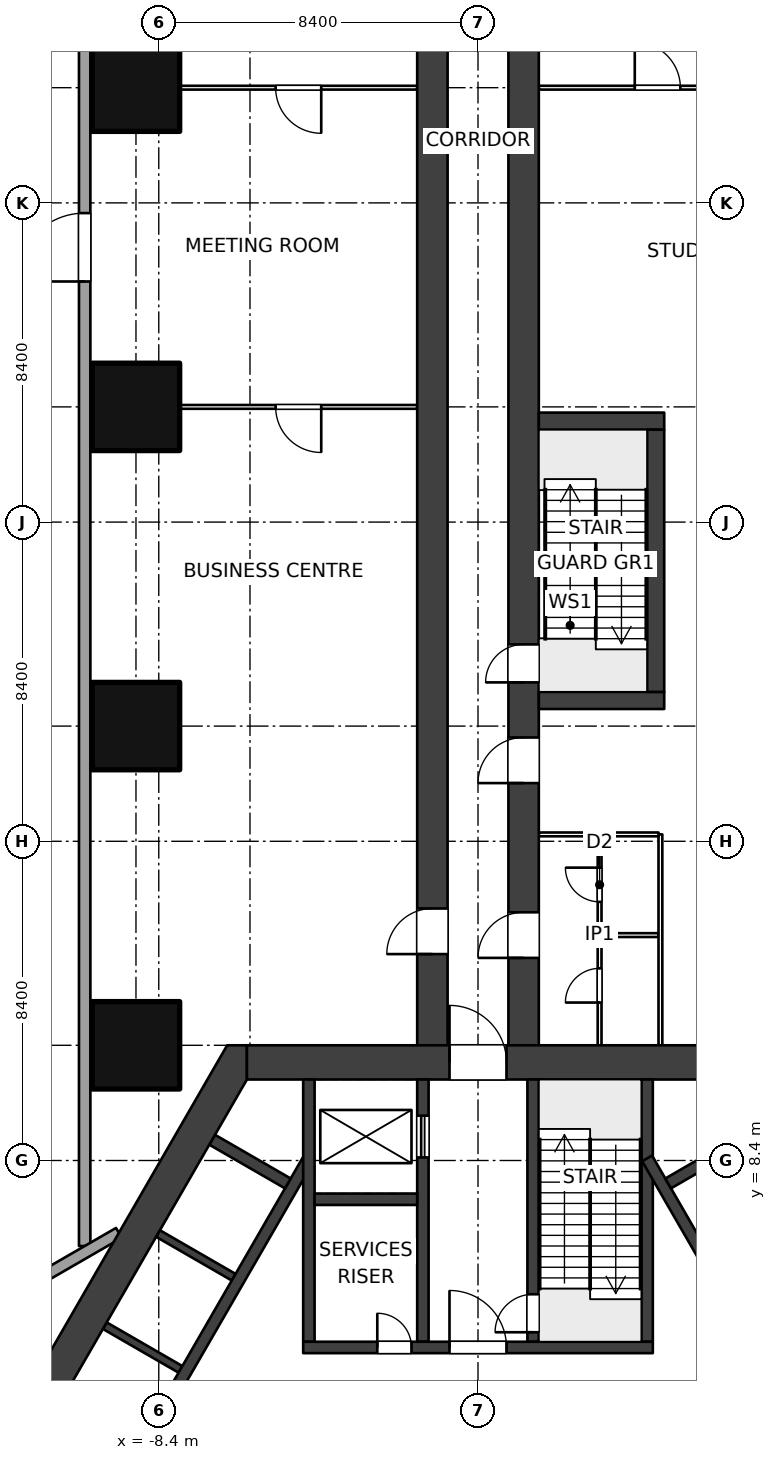
"""IFC4 building model, lengths in metres.
Left out: names, types, materials, properties, quantities, classifications, styles, units other than length and angle.
Written with IfcOpenShell. Run it as: python <this file> out.ifc"""

import sys

from ifc_helpers import new_model, si_unit, direction, frame, frame_2d, origin, origin_2d, place, context, subcontext, project, spatial, polyline, rectangle, outline, extrude, element, fill, save


model = new_model("IFC4")
c1 = context("Model", 3, precision=1e-05, world=origin(), true_north=direction((0.0, 1.0)))
c2 = subcontext(c1, "Body", "Model", "MODEL_VIEW")
j1 = project(units=[si_unit("LENGTHUNIT", "METRE"), si_unit("PLANEANGLEUNIT", "RADIAN")], contexts=[c1])
p1 = place(None, origin())
s1 = spatial("IfcSite", under=j1, at=p1, CompositionType="ELEMENT")
p2 = place(p1, origin())
s2 = spatial("IfcBuilding", under=s1, at=p2, CompositionType="ELEMENT")
p3 = place(p2, frame((0.0, 0.0, 6.0)))
s3 = spatial("IfcBuildingStorey", under=s2, at=p3, CompositionType="ELEMENT", Elevation=6.0)
for number, where, z_axis, x_axis in (
    (1, (-9.0, 11.432, 0.0), (0.0, 0.0, 1.0), (1.0, 0.0, 0.0)),
    (2, (-9.0, 19.832, 0.0), (0.0, 0.0, 1.0), (1.0, 0.0, 0.0)),
    (3, (-9.0, 28.231, 0.0), (0.0, 0.0, 1.0), (1.0, 0.0, 0.0)),
    (4, (-9.0, 36.632, 0.0), (0.0, 0.0, 1.0), (1.0, 0.0, 0.0)),
):
    element("IfcColumn", number, at=place(p3, frame(where, z_axis=z_axis, x_axis=x_axis)), inside=s3, PredefinedType="COLUMN", context=c2, shape_type="SweptSolid", body=[
        extrude(rectangle(XDim=2.3, YDim=2.3, at=origin_2d()), origin(), (0.0, 0.0, 1.0), 5.0),
    ])
p4 = place(p3, frame((-6.08, 10.981, 0.0), z_axis=(0.0, 0.0, 1.0), x_axis=(1.0, 0.0, 0.0)))
e5 = element("IfcWall", 5, at=p4, inside=s3, PredefinedType="SHEAR", context=c2, shape_type="SweptSolid", body=[
    extrude(rectangle(XDim=12.161, YDim=0.9, at=frame_2d((6.08, 0.0))), origin(), (0.0, 0.0, 1.0), 5.0),
])
p5 = place(p4, frame((5.33, 0.0, 0.0)))
e6 = element("IfcOpeningElement", 6, at=p5, cuts=e5, PredefinedType="OPENING", context=c2, shape_type="SweptSolid", body=[
    extrude(rectangle(XDim=1.5, YDim=2.1, at=frame_2d((0.75, 1.05))), frame((0.0, 0.46, 0.0), z_axis=(0.0, -1.0, 0.0), x_axis=(1.0, 0.0, 0.0)), (0.0, 0.0, 1.0), 0.92),
])
p6 = place(p3, origin())
e7 = element("IfcWall", 7, at=p6, inside=s3, PredefinedType="SHEAR", context=c2, shape_type="SweptSolid", body=[
    extrude(outline(polyline([(-6.6, 11.432), (-13.2, 0.0), (-12.94, -0.45), (-12.161, 0.0), (-6.08, 10.531), (-6.08, 11.432), (-6.6, 11.432)])), origin(), (0.0, 0.0, 1.0), 5.0),
])
p7 = place(p3, frame((-4.6, 3.48, 0.0), z_axis=(0.0, 0.0, 1.0), x_axis=(1.0, 0.0, 0.0)))
e8 = element("IfcWall", 8, at=p7, inside=s3, PredefinedType="SHEAR", context=c2, shape_type="SweptSolid", body=[
    extrude(rectangle(XDim=9.2, YDim=0.3, at=frame_2d((4.6, 0.0))), origin(), (0.0, 0.0, 1.0), 5.0),
])
p8 = place(p7, frame((3.85, 0.0, 0.0)))
e9 = element("IfcOpeningElement", 9, at=p8, cuts=e8, PredefinedType="OPENING", context=c2, shape_type="SweptSolid", body=[
    extrude(rectangle(XDim=1.5, YDim=2.1, at=frame_2d((0.75, 1.05))), frame((0.0, 0.16, 0.0), z_axis=(0.0, -1.0, 0.0), x_axis=(1.0, 0.0, 0.0)), (0.0, 0.0, 1.0), 0.32),
])
p9 = place(p7, frame((1.95, 0.0, 0.0)))
e10 = element("IfcOpeningElement", 10, at=p9, cuts=e8, PredefinedType="OPENING", context=c2, shape_type="SweptSolid", body=[
    extrude(rectangle(XDim=0.9, YDim=2.1, at=frame_2d((0.45, 1.05))), frame((0.0, 0.16, 0.0), z_axis=(0.0, -1.0, 0.0), x_axis=(1.0, 0.0, 0.0)), (0.0, 0.0, 1.0), 0.32),
])
p10 = place(p3, frame((1.45, 3.63, 0.0), z_axis=(0.0, 0.0, 1.0), x_axis=(0.0, 1.0, 0.0)))
e11 = element("IfcWall", 11, at=p10, inside=s3, PredefinedType="SHEAR", context=c2, shape_type="SweptSolid", body=[
    extrude(rectangle(XDim=6.902, YDim=0.3, at=frame_2d((3.451, 0.0))), origin(), (0.0, 0.0, 1.0), 5.0),
])
p11 = place(p10, frame((0.25, 0.0, 0.0)))
e12 = element("IfcOpeningElement", 12, at=p11, cuts=e11, PredefinedType="OPENING", context=c2, shape_type="SweptSolid", body=[
    extrude(rectangle(XDim=1.0, YDim=2.1, at=frame_2d((0.5, 1.05))), frame((0.0, 0.16, 0.0), z_axis=(0.0, -1.0, 0.0), x_axis=(1.0, 0.0, 0.0)), (0.0, 0.0, 1.0), 0.32),
])
p12 = place(p3, frame((4.45, 3.63, 0.0), z_axis=(0.0, 0.0, 1.0), x_axis=(0.0, 1.0, 0.0)))
e13 = element("IfcWall", 13, at=p12, inside=s3, PredefinedType="SHEAR", context=c2, shape_type="SweptSolid", body=[
    extrude(rectangle(XDim=6.902, YDim=0.3, at=frame_2d((3.451, 0.0))), origin(), (0.0, 0.0, 1.0), 5.0),
])
p13 = place(p3, frame((-1.45, 3.63, 0.0), z_axis=(0.0, 0.0, 1.0), x_axis=(0.0, 1.0, 0.0)))
e14 = element("IfcWall", 14, at=p13, inside=s3, PredefinedType="SHEAR", context=c2, shape_type="SweptSolid", body=[
    extrude(rectangle(XDim=6.902, YDim=0.3, at=frame_2d((3.451, 0.0))), origin(), (0.0, 0.0, 1.0), 5.0),
])
p14 = place(p13, frame((4.85, 0.0, 0.0)))
e15 = element("IfcOpeningElement", 15, at=p14, cuts=e14, PredefinedType="OPENING", context=c2, shape_type="SweptSolid", body=[
    extrude(rectangle(XDim=1.1, YDim=2.1, at=frame_2d((0.55, 1.05))), frame((0.0, 0.16, 0.0), z_axis=(0.0, -1.0, 0.0), x_axis=(1.0, 0.0, 0.0)), (0.0, 0.0, 1.0), 0.32),
])
p15 = place(p3, frame((-4.45, 3.63, 0.0), z_axis=(0.0, 0.0, 1.0), x_axis=(0.0, 1.0, 0.0)))
e16 = element("IfcWall", 16, at=p15, inside=s3, PredefinedType="SHEAR", context=c2, shape_type="SweptSolid", body=[
    extrude(rectangle(XDim=6.902, YDim=0.3, at=frame_2d((3.451, 0.0))), origin(), (0.0, 0.0, 1.0), 5.0),
])
p16 = place(p3, frame((-4.3, 7.38, 0.0), z_axis=(0.0, 0.0, 1.0), x_axis=(1.0, 0.0, 0.0)))
e17 = element("IfcWall", 17, at=p16, inside=s3, PredefinedType="SHEAR", context=c2, shape_type="SweptSolid", body=[
    extrude(rectangle(XDim=2.7, YDim=0.3, at=frame_2d((1.35, 0.0))), origin(), (0.0, 0.0, 1.0), 5.0),
])
p17 = place(p3, frame((4.45, 8.455, 0.0), z_axis=(0.0, 0.0, 1.0), x_axis=(0.500002290144, -0.866024081565, 0.0)))
e18 = element("IfcWall", 18, at=p17, inside=s3, PredefinedType="SHEAR", context=c2, shape_type="SweptSolid", body=[
    extrude(rectangle(XDim=10.195, YDim=0.3, at=frame_2d((5.098, 0.0))), origin(), (0.0, 0.0, 1.0), 5.0),
])
p18 = place(p3, frame((5.004, 7.796, 0.0), z_axis=(0.0, 0.0, 1.0), x_axis=(0.866053019151, 0.499952165731, 0.0)))
e19 = element("IfcWall", 19, at=p18, inside=s3, PredefinedType="SHEAR", context=c2, shape_type="SweptSolid", body=[
    extrude(rectangle(XDim=2.3, YDim=0.3, at=frame_2d((1.15, 0.0))), origin(), (0.0, 0.0, 1.0), 5.0),
])
p19 = place(p3, frame((-9.548, -0.374, 0.0), z_axis=(0.0, 0.0, 1.0), x_axis=(0.500002290144, 0.866024081565, 0.0)))
e20 = element("IfcWall", 20, at=p19, inside=s3, PredefinedType="SHEAR", context=c2, shape_type="SweptSolid", body=[
    extrude(rectangle(XDim=10.195, YDim=0.3, at=frame_2d((5.098, 0.0))), origin(), (0.0, 0.0, 1.0), 5.0),
])
p20 = place(p3, frame((-5.004, 7.796, 0.0), z_axis=(0.0, 0.0, 1.0), x_axis=(-0.866053019151, 0.499952165731, 0.0)))
e21 = element("IfcWall", 21, at=p20, inside=s3, PredefinedType="SHEAR", context=c2, shape_type="SweptSolid", body=[
    extrude(rectangle(XDim=2.3, YDim=0.3, at=frame_2d((1.15, 0.0))), origin(), (0.0, 0.0, 1.0), 5.0),
])
for number, where, z_axis, x_axis in (
    (22, (-7.829, 2.903, 0.0), (0.0, 0.0, 1.0), (-0.866, 0.5, 0.0)),
    (23, (-6.429, 5.328, 0.0), (0.0, 0.0, 1.0), (-0.866, 0.5, 0.0)),
):
    element("IfcWall", number, at=place(p3, frame(where, z_axis=z_axis, x_axis=x_axis)), inside=s3, PredefinedType="SHEAR", context=c2, shape_type="SweptSolid", body=[
        extrude(rectangle(XDim=2.3, YDim=0.2, at=frame_2d((1.15, 0.0))), origin(), (0.0, 0.0, 1.0), 5.0),
    ])
p21 = place(p3, frame((-1.2, 10.981, 0.0), z_axis=(0.0, 0.0, 1.0), x_axis=(0.0, 1.0, 0.0)))
e24 = element("IfcWall", 24, at=p21, inside=s3, PredefinedType="SHEAR", context=c2, shape_type="SweptSolid", body=[
    extrude(rectangle(XDim=36.75, YDim=0.8, at=frame_2d((18.375, 0.0))), origin(), (0.0, 0.0, 1.0), 5.0),
])
p22 = place(p21, frame((2.85, 0.0, 0.0)))
e25 = element("IfcOpeningElement", 25, at=p22, cuts=e24, PredefinedType="OPENING", context=c2, shape_type="SweptSolid", body=[
    extrude(rectangle(XDim=1.2, YDim=2.1, at=frame_2d((0.6, 1.05))), frame((0.0, 0.41, 0.0), z_axis=(0.0, -1.0, 0.0), x_axis=(1.0, 0.0, 0.0)), (0.0, 0.0, 1.0), 0.82),
])
p23 = place(p3, frame((1.2, 10.981, 0.0), z_axis=(0.0, 0.0, 1.0), x_axis=(0.0, 1.0, 0.0)))
e26 = element("IfcWall", 26, at=p23, inside=s3, PredefinedType="SHEAR", context=c2, shape_type="SweptSolid", body=[
    extrude(rectangle(XDim=36.75, YDim=0.8, at=frame_2d((18.375, 0.0))), origin(), (0.0, 0.0, 1.0), 5.0),
])
p24 = place(p23, frame((10.0, 0.0, 0.0)))
e27 = element("IfcOpeningElement", 27, at=p24, cuts=e26, PredefinedType="OPENING", context=c2, shape_type="SweptSolid", body=[
    extrude(rectangle(XDim=1.0, YDim=2.1, at=frame_2d((0.5, 1.05))), frame((0.0, 0.41, 0.0), z_axis=(0.0, -1.0, 0.0), x_axis=(1.0, 0.0, 0.0)), (0.0, 0.0, 1.0), 0.82),
])
p25 = place(p23, frame((2.75, 0.0, 0.0)))
e28 = element("IfcOpeningElement", 28, at=p25, cuts=e26, PredefinedType="OPENING", context=c2, shape_type="SweptSolid", body=[
    extrude(rectangle(XDim=1.2, YDim=2.1, at=frame_2d((0.6, 1.05))), frame((0.0, 0.41, 0.0), z_axis=(0.0, -1.0, 0.0), x_axis=(1.0, 0.0, 0.0)), (0.0, 0.0, 1.0), 0.82),
])
p26 = place(p23, frame((7.35, 0.0, 0.0)))
e29 = element("IfcOpeningElement", 29, at=p26, cuts=e26, PredefinedType="OPENING", context=c2, shape_type="SweptSolid", body=[
    extrude(rectangle(XDim=1.2, YDim=2.1, at=frame_2d((0.6, 1.05))), frame((0.0, 0.41, 0.0), z_axis=(0.0, -1.0, 0.0), x_axis=(1.0, 0.0, 0.0)), (0.0, 0.0, 1.0), 0.82),
])
p27 = place(p3, frame((-1.6, 28.231, 0.0), z_axis=(0.0, 0.0, 1.0), x_axis=(-1.0, 0.0, 0.0)))
e30 = element("IfcWall", 30, at=p27, inside=s3, PredefinedType="PARTITIONING", context=c2, shape_type="SweptSolid", body=[
    extrude(rectangle(XDim=6.25, YDim=0.1, at=frame_2d((3.125, 0.0))), origin(), (0.0, 0.0, 1.0), 2.9),
])
p28 = place(p27, frame((2.525, 0.0, 0.0)))
e31 = element("IfcOpeningElement", 31, at=p28, cuts=e30, PredefinedType="OPENING", context=c2, shape_type="SweptSolid", body=[
    extrude(rectangle(XDim=1.2, YDim=2.1, at=frame_2d((0.6, 1.05))), frame((0.0, 0.06, 0.0), z_axis=(0.0, -1.0, 0.0), x_axis=(1.0, 0.0, 0.0)), (0.0, 0.0, 1.0), 0.12),
])
p29 = place(p3, frame((-1.6, 36.632, 0.0), z_axis=(0.0, 0.0, 1.0), x_axis=(-1.0, 0.0, 0.0)))
e32 = element("IfcWall", 32, at=p29, inside=s3, PredefinedType="PARTITIONING", context=c2, shape_type="SweptSolid", body=[
    extrude(rectangle(XDim=6.25, YDim=0.1, at=frame_2d((3.125, 0.0))), origin(), (0.0, 0.0, 1.0), 2.9),
])
p30 = place(p29, frame((2.525, 0.0, 0.0)))
e33 = element("IfcOpeningElement", 33, at=p30, cuts=e32, PredefinedType="OPENING", context=c2, shape_type="SweptSolid", body=[
    extrude(rectangle(XDim=1.2, YDim=2.1, at=frame_2d((0.6, 1.05))), frame((0.0, 0.06, 0.0), z_axis=(0.0, -1.0, 0.0), x_axis=(1.0, 0.0, 0.0)), (0.0, 0.0, 1.0), 0.12),
])
p31 = place(p3, frame((3.2, 11.432, 0.0), z_axis=(0.0, 0.0, 1.0), x_axis=(0.0, 1.0, 0.0)))
e34 = element("IfcWall", 34, at=p31, inside=s3, PredefinedType="PARTITIONING", context=c2, shape_type="SweptSolid", body=[
    extrude(rectangle(XDim=5.6, YDim=0.1, at=frame_2d((2.8, 0.0))), origin(), (0.0, 0.0, 1.0), 4.7),
])
p32 = place(p31, frame((1.125, 0.0, 0.0)))
e35 = element("IfcOpeningElement", 35, at=p32, cuts=e34, PredefinedType="OPENING", context=c2, shape_type="SweptSolid", body=[
    extrude(rectangle(XDim=0.9, YDim=2.1, at=frame_2d((0.45, 1.05))), frame((0.0, 0.06, 0.0), z_axis=(0.0, -1.0, 0.0), x_axis=(1.0, 0.0, 0.0)), (0.0, 0.0, 1.0), 0.12),
])
p33 = place(p31, frame((3.775, 0.0, 0.0)))
e36 = element("IfcOpeningElement", 36, at=p33, cuts=e34, PredefinedType="OPENING", context=c2, shape_type="SweptSolid", body=[
    extrude(rectangle(XDim=0.9, YDim=2.1, at=frame_2d((0.45, 1.05))), frame((0.0, 0.06, 0.0), z_axis=(0.0, -1.0, 0.0), x_axis=(1.0, 0.0, 0.0)), (0.0, 0.0, 1.0), 0.12),
])
p34 = place(p3, frame((3.25, 14.332, 0.0), z_axis=(0.0, 0.0, 1.0), x_axis=(1.0, 0.0, 0.0)))
e37 = element("IfcWall", 37, at=p34, inside=s3, PredefinedType="PARTITIONING", context=c2, shape_type="SweptSolid", body=[
    extrude(rectangle(XDim=1.5, YDim=0.1, at=frame_2d((0.75, 0.0))), origin(), (0.0, 0.0, 1.0), 4.7),
])
p35 = place(p3, frame((4.8, 11.432, 0.0), z_axis=(0.0, 0.0, 1.0), x_axis=(0.0, 1.0, 0.0)))
e38 = element("IfcWall", 38, at=p35, inside=s3, PredefinedType="PARTITIONING", context=c2, shape_type="SweptSolid", body=[
    extrude(rectangle(XDim=5.55, YDim=0.1, at=frame_2d((2.775, 0.0))), origin(), (0.0, 0.0, 1.0), 4.7),
])
p36 = place(p3, frame((1.6, 16.981, 0.0), z_axis=(0.0, 0.0, 1.0), x_axis=(1.0, 0.0, 0.0)))
e39 = element("IfcWall", 39, at=p36, inside=s3, PredefinedType="PARTITIONING", context=c2, shape_type="SweptSolid", body=[
    extrude(rectangle(XDim=3.15, YDim=0.1, at=frame_2d((1.575, 0.0))), origin(), (0.0, 0.0, 1.0), 4.7),
])
p37 = place(p3, frame((1.6, 36.632, 0.0), z_axis=(0.0, 0.0, 1.0), x_axis=(1.0, 0.0, 0.0)))
e40 = element("IfcWall", 40, at=p37, inside=s3, PredefinedType="PARTITIONING", context=c2, shape_type="SweptSolid", body=[
    extrude(rectangle(XDim=6.25, YDim=0.1, at=frame_2d((3.125, 0.0))), origin(), (0.0, 0.0, 1.0), 2.9),
])
p38 = place(p37, frame((2.525, 0.0, 0.0)))
e41 = element("IfcOpeningElement", 41, at=p38, cuts=e40, PredefinedType="OPENING", context=c2, shape_type="SweptSolid", body=[
    extrude(rectangle(XDim=1.2, YDim=2.1, at=frame_2d((0.6, 1.05))), frame((0.0, 0.06, 0.0), z_axis=(0.0, -1.0, 0.0), x_axis=(1.0, 0.0, 0.0)), (0.0, 0.0, 1.0), 0.12),
])
p39 = place(p3, frame((-10.35, 6.149, 0.0), z_axis=(0.0, 0.0, 1.0), x_axis=(0.0, 1.0, 0.0)))
e42 = element("IfcWall", 42, at=p39, inside=s3, PredefinedType="SOLIDWALL", context=c2, shape_type="SweptSolid", body=[
    extrude(rectangle(XDim=41.883, YDim=0.3, at=frame_2d((20.941, 0.0))), origin(), (0.0, 0.0, 1.0), 4.7),
])
p40 = place(p39, frame((25.383, 0.0, 0.0)))
e43 = element("IfcOpeningElement", 43, at=p40, cuts=e42, PredefinedType="OPENING", context=c2, shape_type="SweptSolid", body=[
    extrude(rectangle(XDim=1.8, YDim=2.4, at=frame_2d((0.9, 1.2))), frame((0.0, 0.16, 0.0), z_axis=(0.0, -1.0, 0.0), x_axis=(1.0, 0.0, 0.0)), (0.0, 0.0, 1.0), 0.32),
])
p41 = place(p3, frame((-9.45, 6.495, 0.0), z_axis=(0.0, 0.0, 1.0), x_axis=(-0.866025301493, -0.500000177174, 0.0)))
e44 = element("IfcWall", 44, at=p41, inside=s3, PredefinedType="SOLIDWALL", context=c2, shape_type="SweptSolid", body=[
    extrude(rectangle(XDim=43.095, YDim=0.3, at=frame_2d((21.548, 0.0))), origin(), (0.0, 0.0, 1.0), 4.7),
])
p42 = place(p41, frame((26.595, 0.0, 0.0)))
e45 = element("IfcOpeningElement", 45, at=p42, cuts=e44, PredefinedType="OPENING", context=c2, shape_type="SweptSolid", body=[
    extrude(rectangle(XDim=1.8, YDim=2.4, at=frame_2d((0.9, 1.2))), frame((0.0, 0.16, 0.0), z_axis=(0.0, -1.0, 0.0), x_axis=(1.0, 0.0, 0.0)), (0.0, 0.0, 1.0), 0.32),
])
for number, where, z_axis, x_axis in (
    (46, (1.6, 20.507, 0.0), (0.0, 0.0, 1.0), (1.0, 0.0, 0.0)),
    (47, (1.6, 27.856, 0.0), (0.0, 0.0, 1.0), (1.0, 0.0, 0.0)),
):
    element("IfcWall", number, at=place(p3, frame(where, z_axis=z_axis, x_axis=x_axis)), inside=s3, PredefinedType="SOLIDWALL", context=c2, shape_type="SweptSolid", body=[
        extrude(rectangle(XDim=3.3, YDim=0.45, at=frame_2d((1.65, 0.0))), origin(), (0.0, 0.0, 1.0), 5.0),
    ])
p43 = place(p3, frame((4.675, 20.731, 0.0), z_axis=(0.0, 0.0, 1.0), x_axis=(0.0, 1.0, 0.0)))
e48 = element("IfcWall", 48, at=p43, inside=s3, PredefinedType="SOLIDWALL", context=c2, shape_type="SweptSolid", body=[
    extrude(rectangle(XDim=6.9, YDim=0.45, at=frame_2d((3.45, 0.0))), origin(), (0.0, 0.0, 1.0), 5.0),
])
p44 = place(p14, origin())
e49 = element("IfcDoor", 49, at=p44, inside=s3, OperationType="DOUBLE_DOOR_SLIDING", PredefinedType="DOOR", context=c2, shape_type="SweptSolid", body=[
    extrude(rectangle(XDim=1.1, YDim=2.1, at=frame_2d((0.55, 1.05))), frame((0.0, 0.025, 0.0), z_axis=(0.0, -1.0, 0.0), x_axis=(1.0, 0.0, 0.0)), (0.0, 0.0, 1.0), 0.05),
])
fill(e15, e49)
p45 = place(p8, origin())
e50 = element("IfcDoor", 50, at=p45, inside=s3, OperationType="DOUBLE_DOOR_DOUBLE_SWING", PredefinedType="DOOR", context=c2, shape_type="SweptSolid", body=[
    extrude(rectangle(XDim=1.5, YDim=2.1, at=frame_2d((0.75, 1.05))), frame((0.0, 0.025, 0.0), z_axis=(0.0, -1.0, 0.0), x_axis=(1.0, 0.0, 0.0)), (0.0, 0.0, 1.0), 0.05),
])
fill(e9, e50)
p46 = place(p9, origin())
e51 = element("IfcDoor", 51, at=p46, inside=s3, OperationType="SINGLE_SWING_LEFT", PredefinedType="DOOR", context=c2, shape_type="SweptSolid", body=[
    extrude(rectangle(XDim=0.9, YDim=2.1, at=frame_2d((0.45, 1.05))), frame((0.0, 0.025, 0.0), z_axis=(0.0, -1.0, 0.0), x_axis=(1.0, 0.0, 0.0)), (0.0, 0.0, 1.0), 0.05),
])
fill(e10, e51)
p47 = place(p11, origin())
e52 = element("IfcDoor", 52, at=p47, inside=s3, OperationType="SINGLE_SWING_LEFT", PredefinedType="DOOR", context=c2, shape_type="SweptSolid", body=[
    extrude(rectangle(XDim=1.0, YDim=2.1, at=frame_2d((0.5, 1.05))), frame((0.0, 0.025, 0.0), z_axis=(0.0, -1.0, 0.0), x_axis=(1.0, 0.0, 0.0)), (0.0, 0.0, 1.0), 0.05),
])
fill(e12, e52)
p48 = place(p5, origin())
e53 = element("IfcDoor", 53, at=p48, inside=s3, OperationType="DOUBLE_DOOR_DOUBLE_SWING", PredefinedType="DOOR", context=c2, shape_type="SweptSolid", body=[
    extrude(rectangle(XDim=1.5, YDim=2.1, at=frame_2d((0.75, 1.05))), frame((0.0, 0.025, 0.0), z_axis=(0.0, -1.0, 0.0), x_axis=(1.0, 0.0, 0.0)), (0.0, 0.0, 1.0), 0.05),
])
fill(e6, e53)
p49 = place(p24, origin())
e54 = element("IfcDoor", 54, at=p49, inside=s3, OperationType="SINGLE_SWING_LEFT", PredefinedType="DOOR", context=c2, shape_type="SweptSolid", body=[
    extrude(rectangle(XDim=1.0, YDim=2.1, at=frame_2d((0.5, 1.05))), frame((0.0, 0.025, 0.0), z_axis=(0.0, -1.0, 0.0), x_axis=(1.0, 0.0, 0.0)), (0.0, 0.0, 1.0), 0.05),
])
fill(e27, e54)
p50 = place(p28, origin())
e55 = element("IfcDoor", 55, at=p50, inside=s3, OperationType="DOUBLE_SWING_LEFT", PredefinedType="DOOR", context=c2, shape_type="SweptSolid", body=[
    extrude(rectangle(XDim=1.2, YDim=2.1, at=frame_2d((0.6, 1.05))), frame((0.0, 0.025, 0.0), z_axis=(0.0, -1.0, 0.0), x_axis=(1.0, 0.0, 0.0)), (0.0, 0.0, 1.0), 0.05),
])
fill(e31, e55)
p51 = place(p30, origin())
e56 = element("IfcDoor", 56, at=p51, inside=s3, OperationType="DOUBLE_SWING_LEFT", PredefinedType="DOOR", context=c2, shape_type="SweptSolid", body=[
    extrude(rectangle(XDim=1.2, YDim=2.1, at=frame_2d((0.6, 1.05))), frame((0.0, 0.025, 0.0), z_axis=(0.0, -1.0, 0.0), x_axis=(1.0, 0.0, 0.0)), (0.0, 0.0, 1.0), 0.05),
])
fill(e33, e56)
p52 = place(p22, origin())
e57 = element("IfcDoor", 57, at=p52, inside=s3, OperationType="DOUBLE_SWING_LEFT", PredefinedType="DOOR", context=c2, shape_type="SweptSolid", body=[
    extrude(rectangle(XDim=1.2, YDim=2.1, at=frame_2d((0.6, 1.05))), frame((0.0, 0.025, 0.0), z_axis=(0.0, -1.0, 0.0), x_axis=(1.0, 0.0, 0.0)), (0.0, 0.0, 1.0), 0.05),
])
fill(e25, e57)
p53 = place(p32, origin())
e58 = element("IfcDoor", 58, at=p53, inside=s3, OperationType="SINGLE_SWING_LEFT", PredefinedType="DOOR", context=c2, shape_type="SweptSolid", body=[
    extrude(rectangle(XDim=0.9, YDim=2.1, at=frame_2d((0.45, 1.05))), frame((0.0, 0.025, 0.0), z_axis=(0.0, -1.0, 0.0), x_axis=(1.0, 0.0, 0.0)), (0.0, 0.0, 1.0), 0.05),
])
fill(e35, e58)
p54 = place(p33, origin())
e59 = element("IfcDoor", 59, at=p54, inside=s3, OperationType="SINGLE_SWING_RIGHT", PredefinedType="DOOR", context=c2, shape_type="SweptSolid", body=[
    extrude(rectangle(XDim=0.9, YDim=2.1, at=frame_2d((0.45, 1.05))), frame((0.0, 0.025, 0.0), z_axis=(0.0, -1.0, 0.0), x_axis=(1.0, 0.0, 0.0)), (0.0, 0.0, 1.0), 0.05),
])
fill(e36, e59)
p55 = place(p25, origin())
e60 = element("IfcDoor", 60, at=p55, inside=s3, OperationType="DOUBLE_SWING_LEFT", PredefinedType="DOOR", context=c2, shape_type="SweptSolid", body=[
    extrude(rectangle(XDim=1.2, YDim=2.1, at=frame_2d((0.6, 1.05))), frame((0.0, 0.025, 0.0), z_axis=(0.0, -1.0, 0.0), x_axis=(1.0, 0.0, 0.0)), (0.0, 0.0, 1.0), 0.05),
])
fill(e28, e60)
p56 = place(p38, origin())
e61 = element("IfcDoor", 61, at=p56, inside=s3, OperationType="DOUBLE_SWING_LEFT", PredefinedType="DOOR", context=c2, shape_type="SweptSolid", body=[
    extrude(rectangle(XDim=1.2, YDim=2.1, at=frame_2d((0.6, 1.05))), frame((0.0, 0.025, 0.0), z_axis=(0.0, -1.0, 0.0), x_axis=(1.0, 0.0, 0.0)), (0.0, 0.0, 1.0), 0.05),
])
fill(e41, e61)
p57 = place(p26, origin())
e62 = element("IfcDoor", 62, at=p57, inside=s3, OperationType="DOUBLE_SWING_LEFT", PredefinedType="DOOR", context=c2, shape_type="SweptSolid", body=[
    extrude(rectangle(XDim=1.2, YDim=2.1, at=frame_2d((0.6, 1.05))), frame((0.0, 0.025, 0.0), z_axis=(0.0, -1.0, 0.0), x_axis=(1.0, 0.0, 0.0)), (0.0, 0.0, 1.0), 0.05),
])
fill(e29, e62)
p58 = place(p40, origin())
e63 = element("IfcDoor", 63, at=p58, inside=s3, OperationType="DOUBLE_DOOR_DOUBLE_SWING", PredefinedType="DOOR", context=c2, shape_type="SweptSolid", body=[
    extrude(rectangle(XDim=1.8, YDim=2.4, at=frame_2d((0.9, 1.2))), frame((0.0, 0.025, 0.0), z_axis=(0.0, -1.0, 0.0), x_axis=(1.0, 0.0, 0.0)), (0.0, 0.0, 1.0), 0.05),
])
fill(e43, e63)
save(model, sys.argv[1])
